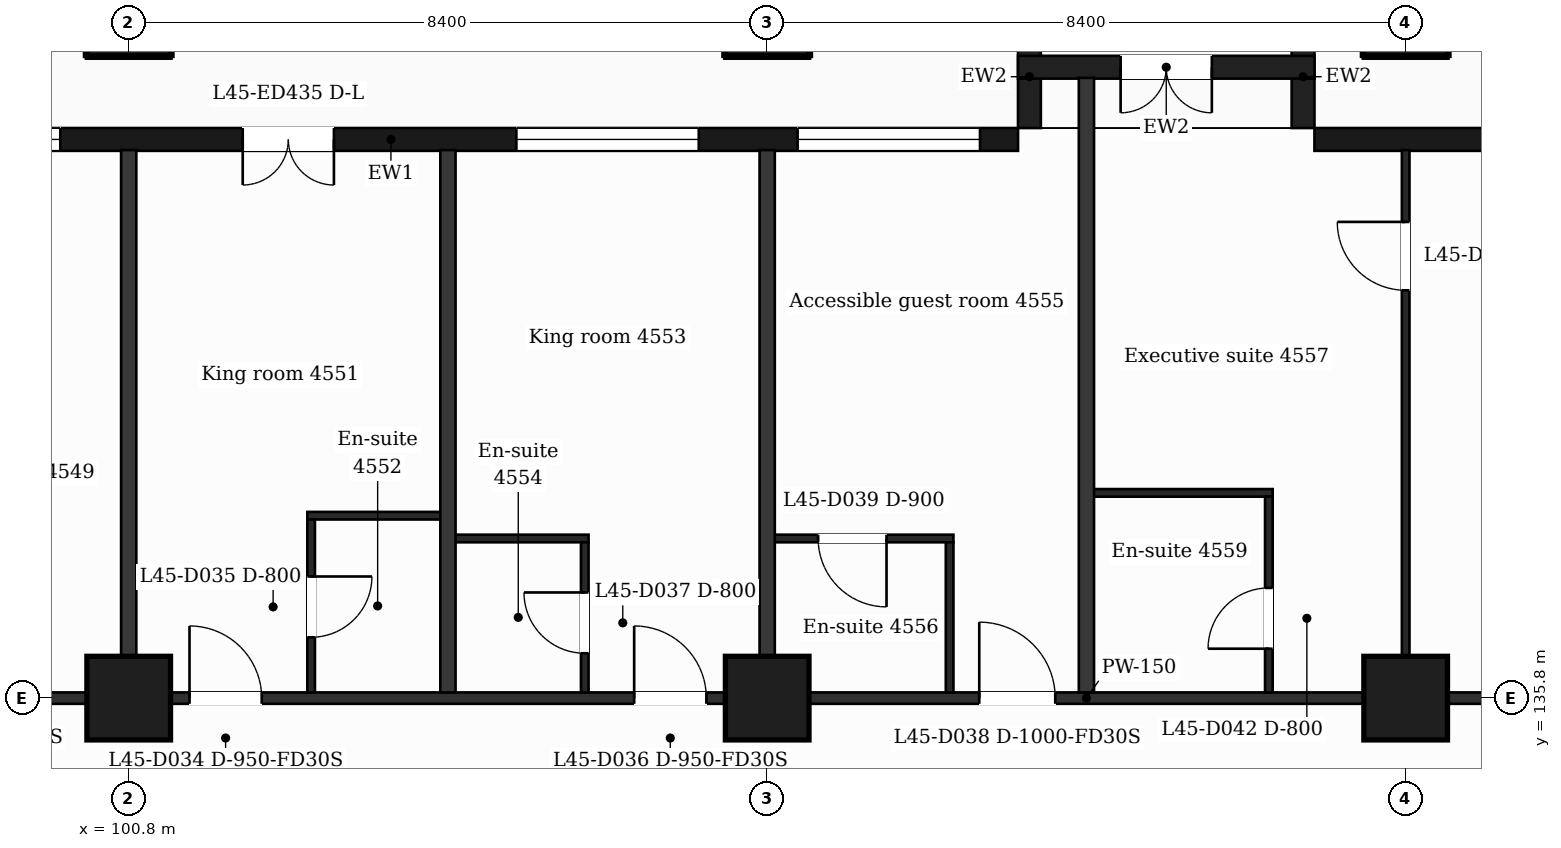
"""IFC4 building model, lengths in metres.
Left out: names, types, materials, properties, quantities, classifications, styles, units other than length and angle.
Written with IfcOpenShell. Run it as: python <this file> out.ifc"""

import sys

from ifc_helpers import new_model, si_unit, direction, frame, frame_2d, origin, origin_2d, place, context, subcontext, project, spatial, rectangle, extrude, element, fill, save


model = new_model("IFC4")
c1 = context("Model", 3, precision=1e-05, world=origin(), true_north=direction((0.0, 1.0)))
c2 = subcontext(c1, "Body", "Model", "MODEL_VIEW")
j1 = project(units=[si_unit("LENGTHUNIT", "METRE"), si_unit("PLANEANGLEUNIT", "RADIAN")], contexts=[c1])
p1 = place(None, origin())
s1 = spatial("IfcSite", under=j1, at=p1, CompositionType="ELEMENT")
p2 = place(p1, origin())
s2 = spatial("IfcBuilding", under=s1, at=p2, CompositionType="ELEMENT")
p3 = place(p2, frame((0.0, 0.0, 188.5)))
s3 = spatial("IfcBuildingStorey", under=s2, at=p3, CompositionType="ELEMENT", Elevation=188.5)
for number, where, z_axis, x_axis in (
    (1, (100.8, 135.8, 0.0), (0.0, 0.0, 1.0), (1.0, 0.0, 0.0)),
    (2, (109.2, 135.8, 0.0), (0.0, 0.0, 1.0), (1.0, 0.0, 0.0)),
    (3, (117.6, 135.8, 0.0), (0.0, 0.0, 1.0), (1.0, 0.0, 0.0)),
    (4, (100.8, 144.8, 0.0), (0.0, 0.0, 1.0), (1.0, 0.0, 0.0)),
    (5, (109.2, 144.8, 0.0), (0.0, 0.0, 1.0), (1.0, 0.0, 0.0)),
    (6, (117.6, 144.8, 0.0), (0.0, 0.0, 1.0), (1.0, 0.0, 0.0)),
):
    element("IfcColumn", number, at=place(p3, frame(where, z_axis=z_axis, x_axis=x_axis)), inside=s3, PredefinedType="COLUMN", context=c2, shape_type="SweptSolid", body=[
        extrude(rectangle(XDim=1.1, YDim=1.1, at=origin_2d()), origin(), (0.0, 0.0, 1.0), 3.7),
    ])
p4 = place(p3, frame((130.65, 143.15, 0.0), z_axis=(0.0, 0.0, 1.0), x_axis=(-1.0, 0.0, 0.0)))
e7 = element("IfcWall", 7, at=p4, inside=s3, PredefinedType="SOLIDWALL", context=c2, shape_type="SweptSolid", body=[
    extrude(rectangle(XDim=14.25, YDim=0.3, at=frame_2d((7.125, 0.0))), origin(), (0.0, 0.0, 1.0), 3.25),
])
p5 = place(p4, frame((1.35, 0.0, 0.9)))
e8 = element("IfcOpeningElement", 8, at=p5, cuts=e7, PredefinedType="OPENING", context=c2, shape_type="SweptSolid", body=[
    extrude(rectangle(XDim=2.4, YDim=2.1, at=frame_2d((1.2, 1.05))), frame((0.0, 0.16, 0.0), z_axis=(0.0, -1.0, 0.0), x_axis=(1.0, 0.0, 0.0)), (0.0, 0.0, 1.0), 0.32),
])
p6 = place(p4, frame((5.25, 0.0, 0.0)))
e9 = element("IfcOpeningElement", 9, at=p6, cuts=e7, PredefinedType="OPENING", context=c2, shape_type="SweptSolid", body=[
    extrude(rectangle(XDim=1.2, YDim=2.4, at=frame_2d((0.6, 1.2))), frame((0.0, 0.16, 0.0), z_axis=(0.0, -1.0, 0.0), x_axis=(1.0, 0.0, 0.0)), (0.0, 0.0, 1.0), 0.32),
])
p7 = place(p4, frame((7.05, 0.0, 0.9)))
e10 = element("IfcOpeningElement", 10, at=p7, cuts=e7, PredefinedType="OPENING", context=c2, shape_type="SweptSolid", body=[
    extrude(rectangle(XDim=1.2, YDim=2.1, at=frame_2d((0.6, 1.05))), frame((0.0, 0.16, 0.0), z_axis=(0.0, -1.0, 0.0), x_axis=(1.0, 0.0, 0.0)), (0.0, 0.0, 1.0), 0.32),
])
p8 = place(p4, frame((10.35, 0.0, 0.9)))
e11 = element("IfcOpeningElement", 11, at=p8, cuts=e7, PredefinedType="OPENING", context=c2, shape_type="SweptSolid", body=[
    extrude(rectangle(XDim=1.2, YDim=2.1, at=frame_2d((0.6, 1.05))), frame((0.0, 0.16, 0.0), z_axis=(0.0, -1.0, 0.0), x_axis=(1.0, 0.0, 0.0)), (0.0, 0.0, 1.0), 0.32),
])
p9 = place(p3, frame((112.5, 143.15, 0.0), z_axis=(0.0, 0.0, 1.0), x_axis=(-1.0, 0.0, 0.0)))
e12 = element("IfcWall", 12, at=p9, inside=s3, PredefinedType="SOLIDWALL", context=c2, shape_type="SweptSolid", body=[
    extrude(rectangle(XDim=16.5, YDim=0.3, at=frame_2d((8.25, 0.0))), origin(), (0.0, 0.0, 1.0), 3.25),
])
p10 = place(p9, frame((0.5, 0.0, 0.9)))
e13 = element("IfcOpeningElement", 13, at=p10, cuts=e12, PredefinedType="OPENING", context=c2, shape_type="SweptSolid", body=[
    extrude(rectangle(XDim=2.4, YDim=2.1, at=frame_2d((1.2, 1.05))), frame((0.0, 0.16, 0.0), z_axis=(0.0, -1.0, 0.0), x_axis=(1.0, 0.0, 0.0)), (0.0, 0.0, 1.0), 0.32),
])
p11 = place(p9, frame((4.2, 0.0, 0.9)))
e14 = element("IfcOpeningElement", 14, at=p11, cuts=e12, PredefinedType="OPENING", context=c2, shape_type="SweptSolid", body=[
    extrude(rectangle(XDim=2.4, YDim=2.1, at=frame_2d((1.2, 1.05))), frame((0.0, 0.16, 0.0), z_axis=(0.0, -1.0, 0.0), x_axis=(1.0, 0.0, 0.0)), (0.0, 0.0, 1.0), 0.32),
])
p12 = place(p9, frame((9.0, 0.0, 0.0)))
e15 = element("IfcOpeningElement", 15, at=p12, cuts=e12, PredefinedType="OPENING", context=c2, shape_type="SweptSolid", body=[
    extrude(rectangle(XDim=1.2, YDim=2.4, at=frame_2d((0.6, 1.2))), frame((0.0, 0.16, 0.0), z_axis=(0.0, -1.0, 0.0), x_axis=(1.0, 0.0, 0.0)), (0.0, 0.0, 1.0), 0.32),
])
p13 = place(p9, frame((12.6, 0.0, 0.9)))
e16 = element("IfcOpeningElement", 16, at=p13, cuts=e12, PredefinedType="OPENING", context=c2, shape_type="SweptSolid", body=[
    extrude(rectangle(XDim=2.4, YDim=2.1, at=frame_2d((1.2, 1.05))), frame((0.0, 0.16, 0.0), z_axis=(0.0, -1.0, 0.0), x_axis=(1.0, 0.0, 0.0)), (0.0, 0.0, 1.0), 0.32),
])
for number, where, z_axis, x_axis in (
    (17, (116.25, 143.3, 0.0), (0.0, 0.0, 1.0), (0.0, 1.0, 0.0)),
    (18, (112.65, 143.3, 0.0), (0.0, 0.0, 1.0), (0.0, 1.0, 0.0)),
):
    element("IfcWall", number, at=place(p3, frame(where, z_axis=z_axis, x_axis=x_axis)), inside=s3, PredefinedType="SOLIDWALL", context=c2, shape_type="SweptSolid", body=[
        extrude(rectangle(XDim=1.35, YDim=0.3, at=frame_2d((0.675, 0.0))), origin(), (0.0, 0.0, 1.0), 3.25),
    ])
p14 = place(p3, frame((116.4, 144.1, 0.0), z_axis=(0.0, 0.0, 1.0), x_axis=(-1.0, 0.0, 0.0)))
e19 = element("IfcWall", 19, at=p14, inside=s3, PredefinedType="SOLIDWALL", context=c2, shape_type="SweptSolid", body=[
    extrude(rectangle(XDim=3.9, YDim=0.3, at=frame_2d((1.95, 0.0))), origin(), (0.0, 0.0, 1.0), 3.25),
])
p15 = place(p14, frame((1.35, 0.0, 0.0)))
e20 = element("IfcOpeningElement", 20, at=p15, cuts=e19, PredefinedType="OPENING", context=c2, shape_type="SweptSolid", body=[
    extrude(rectangle(XDim=1.2, YDim=2.4, at=frame_2d((0.6, 1.2))), frame((0.0, 0.16, 0.0), z_axis=(0.0, -1.0, 0.0), x_axis=(1.0, 0.0, 0.0)), (0.0, 0.0, 1.0), 0.32),
])
p16 = place(p3, frame((90.895, 135.8, 0.0), z_axis=(0.0, 0.0, 1.0), x_axis=(1.0, 0.0, 0.0)))
e21 = element("IfcWall", 21, at=p16, inside=s3, PredefinedType="PARTITIONING", context=c2, shape_type="SweptSolid", body=[
    extrude(rectangle(XDim=45.011, YDim=0.15, at=frame_2d((22.505, 0.0))), origin(), (0.0, 0.0, 1.0), 3.25),
])
p17 = place(p16, frame((6.906, 0.0, 0.0)))
e22 = element("IfcOpeningElement", 22, at=p17, cuts=e21, PredefinedType="OPENING", context=c2, shape_type="SweptSolid", body=[
    extrude(rectangle(XDim=1.0, YDim=2.1, at=frame_2d((0.5, 1.05))), frame((0.0, 0.085, 0.0), z_axis=(0.0, -1.0, 0.0), x_axis=(1.0, 0.0, 0.0)), (0.0, 0.0, 1.0), 0.17),
])
p18 = place(p16, frame((10.705, 0.0, 0.0)))
e23 = element("IfcOpeningElement", 23, at=p18, cuts=e21, PredefinedType="OPENING", context=c2, shape_type="SweptSolid", body=[
    extrude(rectangle(XDim=0.95, YDim=2.1, at=frame_2d((0.475, 1.05))), frame((0.0, 0.085, 0.0), z_axis=(0.0, -1.0, 0.0), x_axis=(1.0, 0.0, 0.0)), (0.0, 0.0, 1.0), 0.17),
])
p19 = place(p16, frame((16.555, 0.0, 0.0)))
e24 = element("IfcOpeningElement", 24, at=p19, cuts=e21, PredefinedType="OPENING", context=c2, shape_type="SweptSolid", body=[
    extrude(rectangle(XDim=0.95, YDim=2.1, at=frame_2d((0.475, 1.05))), frame((0.0, 0.085, 0.0), z_axis=(0.0, -1.0, 0.0), x_axis=(1.0, 0.0, 0.0)), (0.0, 0.0, 1.0), 0.17),
])
p20 = place(p16, frame((21.095, 0.0, 0.0)))
e25 = element("IfcOpeningElement", 25, at=p20, cuts=e21, PredefinedType="OPENING", context=c2, shape_type="SweptSolid", body=[
    extrude(rectangle(XDim=1.0, YDim=2.1, at=frame_2d((0.5, 1.05))), frame((0.0, 0.085, 0.0), z_axis=(0.0, -1.0, 0.0), x_axis=(1.0, 0.0, 0.0)), (0.0, 0.0, 1.0), 0.17),
])
p21 = place(p16, frame((30.406, 0.0, 0.0)))
e26 = element("IfcOpeningElement", 26, at=p21, cuts=e21, PredefinedType="OPENING", context=c2, shape_type="SweptSolid", body=[
    extrude(rectangle(XDim=1.0, YDim=2.1, at=frame_2d((0.5, 1.05))), frame((0.0, 0.085, 0.0), z_axis=(0.0, -1.0, 0.0), x_axis=(1.0, 0.0, 0.0)), (0.0, 0.0, 1.0), 0.17),
])
p22 = place(p16, frame((36.005, 0.0, 0.0)))
e27 = element("IfcOpeningElement", 27, at=p22, cuts=e21, PredefinedType="OPENING", context=c2, shape_type="SweptSolid", body=[
    extrude(rectangle(XDim=1.0, YDim=2.1, at=frame_2d((0.5, 1.05))), frame((0.0, 0.085, 0.0), z_axis=(0.0, -1.0, 0.0), x_axis=(1.0, 0.0, 0.0)), (0.0, 0.0, 1.0), 0.17),
])
p23 = place(p3, frame((105.0, 137.9, 0.0), z_axis=(0.0, 0.0, 1.0), x_axis=(1.0, 0.0, 0.0)))
e28 = element("IfcWall", 28, at=p23, inside=s3, PredefinedType="PARTITIONING", context=c2, shape_type="SweptSolid", body=[
    extrude(rectangle(XDim=1.85, YDim=0.1, at=frame_2d((0.925, 0.0))), origin(), (0.0, 0.0, 1.0), 3.25),
])
p24 = place(p3, frame((109.2, 137.9, 0.0), z_axis=(0.0, 0.0, 1.0), x_axis=(1.0, 0.0, 0.0)))
e29 = element("IfcWall", 29, at=p24, inside=s3, PredefinedType="PARTITIONING", context=c2, shape_type="SweptSolid", body=[
    extrude(rectangle(XDim=2.45, YDim=0.1, at=frame_2d((1.225, 0.0))), origin(), (0.0, 0.0, 1.0), 3.25),
])
p25 = place(p24, frame((0.67, 0.0, 0.0)))
e30 = element("IfcOpeningElement", 30, at=p25, cuts=e29, PredefinedType="OPENING", context=c2, shape_type="SweptSolid", body=[
    extrude(rectangle(XDim=0.9, YDim=2.1, at=frame_2d((0.45, 1.05))), frame((0.0, 0.06, 0.0), z_axis=(0.0, -1.0, 0.0), x_axis=(1.0, 0.0, 0.0)), (0.0, 0.0, 1.0), 0.12),
])
p26 = place(p3, frame((103.15, 138.2, 0.0), z_axis=(0.0, 0.0, 1.0), x_axis=(1.0, 0.0, 0.0)))
e31 = element("IfcWall", 31, at=p26, inside=s3, PredefinedType="PARTITIONING", context=c2, shape_type="SweptSolid", body=[
    extrude(rectangle(XDim=1.85, YDim=0.1, at=frame_2d((0.925, 0.0))), origin(), (0.0, 0.0, 1.0), 3.25),
])
p27 = place(p3, frame((113.4, 138.5, 0.0), z_axis=(0.0, 0.0, 1.0), x_axis=(1.0, 0.0, 0.0)))
e32 = element("IfcWall", 32, at=p27, inside=s3, PredefinedType="PARTITIONING", context=c2, shape_type="SweptSolid", body=[
    extrude(rectangle(XDim=2.45, YDim=0.1, at=frame_2d((1.225, 0.0))), origin(), (0.0, 0.0, 1.0), 3.25),
])
p28 = place(p3, frame((100.8, 135.875, 0.0), z_axis=(0.0, 0.0, 1.0), x_axis=(0.0, 1.0, 0.0)))
e33 = element("IfcWall", 33, at=p28, inside=s3, PredefinedType="PARTITIONING", context=c2, shape_type="SweptSolid", body=[
    extrude(rectangle(XDim=7.135, YDim=0.2, at=frame_2d((3.567, 0.0))), origin(), (0.0, 0.0, 1.0), 3.25),
])
p29 = place(p3, frame((103.2, 135.875, 0.0), z_axis=(0.0, 0.0, 1.0), x_axis=(0.0, 1.0, 0.0)))
e34 = element("IfcWall", 34, at=p29, inside=s3, PredefinedType="PARTITIONING", context=c2, shape_type="SweptSolid", body=[
    extrude(rectangle(XDim=2.275, YDim=0.1, at=frame_2d((1.137, 0.0))), origin(), (0.0, 0.0, 1.0), 3.25),
])
p30 = place(p29, frame((0.725, 0.0, 0.0)))
e35 = element("IfcOpeningElement", 35, at=p30, cuts=e34, PredefinedType="OPENING", context=c2, shape_type="SweptSolid", body=[
    extrude(rectangle(XDim=0.8, YDim=2.1, at=frame_2d((0.4, 1.05))), frame((0.0, 0.06, 0.0), z_axis=(0.0, -1.0, 0.0), x_axis=(1.0, 0.0, 0.0)), (0.0, 0.0, 1.0), 0.12),
])
p31 = place(p3, frame((105.0, 135.875, 0.0), z_axis=(0.0, 0.0, 1.0), x_axis=(0.0, 1.0, 0.0)))
e36 = element("IfcWall", 36, at=p31, inside=s3, PredefinedType="PARTITIONING", context=c2, shape_type="SweptSolid", body=[
    extrude(rectangle(XDim=7.135, YDim=0.2, at=frame_2d((3.567, 0.0))), origin(), (0.0, 0.0, 1.0), 3.25),
])
p32 = place(p3, frame((106.8, 135.875, 0.0), z_axis=(0.0, 0.0, 1.0), x_axis=(0.0, 1.0, 0.0)))
e37 = element("IfcWall", 37, at=p32, inside=s3, PredefinedType="PARTITIONING", context=c2, shape_type="SweptSolid", body=[
    extrude(rectangle(XDim=1.975, YDim=0.1, at=frame_2d((0.988, 0.0))), origin(), (0.0, 0.0, 1.0), 3.25),
])
p33 = place(p32, frame((0.515, 0.0, 0.0)))
e38 = element("IfcOpeningElement", 38, at=p33, cuts=e37, PredefinedType="OPENING", context=c2, shape_type="SweptSolid", body=[
    extrude(rectangle(XDim=0.8, YDim=2.1, at=frame_2d((0.4, 1.05))), frame((0.0, 0.06, 0.0), z_axis=(0.0, -1.0, 0.0), x_axis=(1.0, 0.0, 0.0)), (0.0, 0.0, 1.0), 0.12),
])
p34 = place(p3, frame((109.2, 135.875, 0.0), z_axis=(0.0, 0.0, 1.0), x_axis=(0.0, 1.0, 0.0)))
e39 = element("IfcWall", 39, at=p34, inside=s3, PredefinedType="PARTITIONING", context=c2, shape_type="SweptSolid", body=[
    extrude(rectangle(XDim=7.135, YDim=0.2, at=frame_2d((3.567, 0.0))), origin(), (0.0, 0.0, 1.0), 3.25),
])
p35 = place(p3, frame((111.6, 135.875, 0.0), z_axis=(0.0, 0.0, 1.0), x_axis=(0.0, 1.0, 0.0)))
e40 = element("IfcWall", 40, at=p35, inside=s3, PredefinedType="PARTITIONING", context=c2, shape_type="SweptSolid", body=[
    extrude(rectangle(XDim=1.975, YDim=0.1, at=frame_2d((0.988, 0.0))), origin(), (0.0, 0.0, 1.0), 3.25),
])
p36 = place(p3, frame((113.4, 135.875, 0.0), z_axis=(0.0, 0.0, 1.0), x_axis=(0.0, 1.0, 0.0)))
e41 = element("IfcWall", 41, at=p36, inside=s3, PredefinedType="PARTITIONING", context=c2, shape_type="SweptSolid", body=[
    extrude(rectangle(XDim=8.085, YDim=0.2, at=frame_2d((4.042, 0.0))), origin(), (0.0, 0.0, 1.0), 3.25),
])
p37 = place(p3, frame((115.8, 135.875, 0.0), z_axis=(0.0, 0.0, 1.0), x_axis=(0.0, 1.0, 0.0)))
e42 = element("IfcWall", 42, at=p37, inside=s3, PredefinedType="PARTITIONING", context=c2, shape_type="SweptSolid", body=[
    extrude(rectangle(XDim=2.575, YDim=0.1, at=frame_2d((1.288, 0.0))), origin(), (0.0, 0.0, 1.0), 3.25),
])
p38 = place(p37, frame((0.575, 0.0, 0.0)))
e43 = element("IfcOpeningElement", 43, at=p38, cuts=e42, PredefinedType="OPENING", context=c2, shape_type="SweptSolid", body=[
    extrude(rectangle(XDim=0.8, YDim=2.1, at=frame_2d((0.4, 1.05))), frame((0.0, 0.06, 0.0), z_axis=(0.0, -1.0, 0.0), x_axis=(1.0, 0.0, 0.0)), (0.0, 0.0, 1.0), 0.12),
])
p39 = place(p3, frame((117.6, 135.875, 0.0), z_axis=(0.0, 0.0, 1.0), x_axis=(0.0, 1.0, 0.0)))
e44 = element("IfcWall", 44, at=p39, inside=s3, PredefinedType="PARTITIONING", context=c2, shape_type="SweptSolid", body=[
    extrude(rectangle(XDim=7.135, YDim=0.1, at=frame_2d((3.567, 0.0))), origin(), (0.0, 0.0, 1.0), 3.25),
])
p40 = place(p39, frame((5.29, 0.0, 0.0)))
e45 = element("IfcOpeningElement", 45, at=p40, cuts=e44, PredefinedType="OPENING", context=c2, shape_type="SweptSolid", body=[
    extrude(rectangle(XDim=0.9, YDim=2.1, at=frame_2d((0.45, 1.05))), frame((0.0, 0.06, 0.0), z_axis=(0.0, -1.0, 0.0), x_axis=(1.0, 0.0, 0.0)), (0.0, 0.0, 1.0), 0.12),
])
p41 = place(p10, origin())
e46 = element("IfcWindow", 46, at=p41, inside=s3, PartitioningType="SINGLE_PANEL", PredefinedType="WINDOW", context=c2, shape_type="SweptSolid", body=[
    extrude(rectangle(XDim=2.4, YDim=2.1, at=frame_2d((1.2, 1.05))), frame((0.0, 0.03, 0.0), z_axis=(0.0, -1.0, 0.0), x_axis=(1.0, 0.0, 0.0)), (0.0, 0.0, 1.0), 0.06),
])
fill(e13, e46)
p42 = place(p11, origin())
e47 = element("IfcWindow", 47, at=p42, inside=s3, PartitioningType="SINGLE_PANEL", PredefinedType="WINDOW", context=c2, shape_type="SweptSolid", body=[
    extrude(rectangle(XDim=2.4, YDim=2.1, at=frame_2d((1.2, 1.05))), frame((0.0, 0.03, 0.0), z_axis=(0.0, -1.0, 0.0), x_axis=(1.0, 0.0, 0.0)), (0.0, 0.0, 1.0), 0.06),
])
fill(e14, e47)
p43 = place(p12, origin())
e48 = element("IfcDoor", 48, at=p43, inside=s3, OperationType="DOUBLE_DOOR_SINGLE_SWING", PredefinedType="DOOR", context=c2, shape_type="SweptSolid", body=[
    extrude(rectangle(XDim=1.2, YDim=2.4, at=frame_2d((0.6, 1.2))), frame((0.0, 0.025, 0.0), z_axis=(0.0, -1.0, 0.0), x_axis=(1.0, 0.0, 0.0)), (0.0, 0.0, 1.0), 0.05),
])
fill(e15, e48)
p44 = place(p13, origin())
e49 = element("IfcWindow", 49, at=p44, inside=s3, PartitioningType="SINGLE_PANEL", PredefinedType="WINDOW", context=c2, shape_type="SweptSolid", body=[
    extrude(rectangle(XDim=2.4, YDim=2.1, at=frame_2d((1.2, 1.05))), frame((0.0, 0.03, 0.0), z_axis=(0.0, -1.0, 0.0), x_axis=(1.0, 0.0, 0.0)), (0.0, 0.0, 1.0), 0.06),
])
fill(e16, e49)
p45 = place(p15, origin())
e50 = element("IfcDoor", 50, at=p45, inside=s3, OperationType="DOUBLE_DOOR_SINGLE_SWING", PredefinedType="DOOR", context=c2, shape_type="SweptSolid", body=[
    extrude(rectangle(XDim=1.2, YDim=2.4, at=frame_2d((0.6, 1.2))), frame((0.0, 0.025, 0.0), z_axis=(0.0, -1.0, 0.0), x_axis=(1.0, 0.0, 0.0)), (0.0, 0.0, 1.0), 0.05),
])
fill(e20, e50)
p46 = place(p18, origin())
e51 = element("IfcDoor", 51, at=p46, inside=s3, OperationType="SINGLE_SWING_LEFT", PredefinedType="DOOR", context=c2, shape_type="SweptSolid", body=[
    extrude(rectangle(XDim=0.95, YDim=2.1, at=frame_2d((0.475, 1.05))), frame((0.0, 0.025, 0.0), z_axis=(0.0, -1.0, 0.0), x_axis=(1.0, 0.0, 0.0)), (0.0, 0.0, 1.0), 0.05),
])
fill(e23, e51)
p47 = place(p30, origin())
e52 = element("IfcDoor", 52, at=p47, inside=s3, OperationType="SINGLE_SWING_RIGHT", PredefinedType="DOOR", context=c2, shape_type="SweptSolid", body=[
    extrude(rectangle(XDim=0.8, YDim=2.1, at=frame_2d((0.4, 1.05))), frame((0.0, 0.025, 0.0), z_axis=(0.0, -1.0, 0.0), x_axis=(1.0, 0.0, 0.0)), (0.0, 0.0, 1.0), 0.05),
])
fill(e35, e52)
p48 = place(p19, origin())
e53 = element("IfcDoor", 53, at=p48, inside=s3, OperationType="SINGLE_SWING_LEFT", PredefinedType="DOOR", context=c2, shape_type="SweptSolid", body=[
    extrude(rectangle(XDim=0.95, YDim=2.1, at=frame_2d((0.475, 1.05))), frame((0.0, 0.025, 0.0), z_axis=(0.0, -1.0, 0.0), x_axis=(1.0, 0.0, 0.0)), (0.0, 0.0, 1.0), 0.05),
])
fill(e24, e53)
p49 = place(p33, origin())
e54 = element("IfcDoor", 54, at=p49, inside=s3, OperationType="SINGLE_SWING_RIGHT", PredefinedType="DOOR", context=c2, shape_type="SweptSolid", body=[
    extrude(rectangle(XDim=0.8, YDim=2.1, at=frame_2d((0.4, 1.05))), frame((0.0, 0.025, 0.0), z_axis=(0.0, -1.0, 0.0), x_axis=(1.0, 0.0, 0.0)), (0.0, 0.0, 1.0), 0.05),
])
fill(e38, e54)
p50 = place(p20, origin())
e55 = element("IfcDoor", 55, at=p50, inside=s3, OperationType="SINGLE_SWING_LEFT", PredefinedType="DOOR", context=c2, shape_type="SweptSolid", body=[
    extrude(rectangle(XDim=1.0, YDim=2.1, at=frame_2d((0.5, 1.05))), frame((0.0, 0.025, 0.0), z_axis=(0.0, -1.0, 0.0), x_axis=(1.0, 0.0, 0.0)), (0.0, 0.0, 1.0), 0.05),
])
fill(e25, e55)
p51 = place(p25, origin())
e56 = element("IfcDoor", 56, at=p51, inside=s3, OperationType="SINGLE_SWING_RIGHT", PredefinedType="DOOR", context=c2, shape_type="SweptSolid", body=[
    extrude(rectangle(XDim=0.9, YDim=2.1, at=frame_2d((0.45, 1.05))), frame((0.0, 0.025, 0.0), z_axis=(0.0, -1.0, 0.0), x_axis=(1.0, 0.0, 0.0)), (0.0, 0.0, 1.0), 0.05),
])
fill(e30, e56)
p52 = place(p40, origin())
e57 = element("IfcDoor", 57, at=p52, inside=s3, OperationType="SINGLE_SWING_RIGHT", PredefinedType="DOOR", context=c2, shape_type="SweptSolid", body=[
    extrude(rectangle(XDim=0.9, YDim=2.1, at=frame_2d((0.45, 1.05))), frame((0.0, 0.025, 0.0), z_axis=(0.0, -1.0, 0.0), x_axis=(1.0, 0.0, 0.0)), (0.0, 0.0, 1.0), 0.05),
])
fill(e45, e57)
p53 = place(p38, origin())
e58 = element("IfcDoor", 58, at=p53, inside=s3, OperationType="SINGLE_SWING_LEFT", PredefinedType="DOOR", context=c2, shape_type="SweptSolid", body=[
    extrude(rectangle(XDim=0.8, YDim=2.1, at=frame_2d((0.4, 1.05))), frame((0.0, 0.025, 0.0), z_axis=(0.0, -1.0, 0.0), x_axis=(1.0, 0.0, 0.0)), (0.0, 0.0, 1.0), 0.05),
])
fill(e43, e58)
save(model, sys.argv[1])
